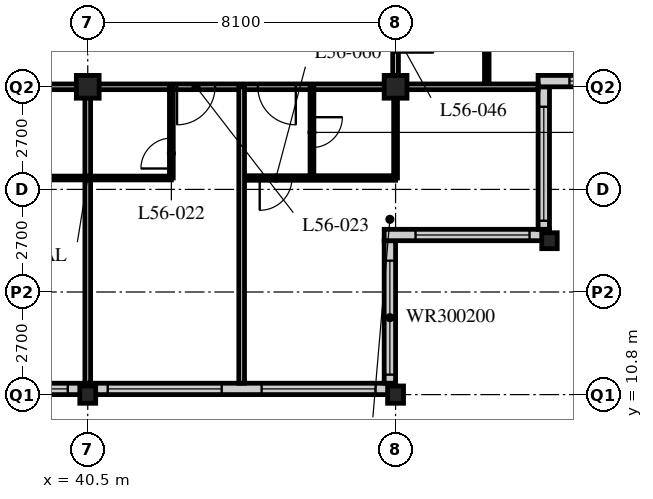
"""IFC4 building model, lengths in metres.
Left out: names, types, materials, properties, quantities, classifications, styles, units other than length and angle.
Written with IfcOpenShell. Run it as: python <this file> out.ifc"""

import sys

from ifc_helpers import new_model, si_unit, direction, frame, frame_2d, origin, origin_2d, place, context, subcontext, project, spatial, rectangle, hollow_rectangle, i_section, extrude, element, fill, save


model = new_model("IFC4")
c1 = context("Model", 3, precision=1e-05, world=origin(), true_north=direction((0.0, 1.0)))
c2 = subcontext(c1, "Body", "Model", "MODEL_VIEW")
j1 = project(units=[si_unit("LENGTHUNIT", "METRE"), si_unit("PLANEANGLEUNIT", "RADIAN")], contexts=[c1])
p1 = place(None, origin())
s1 = spatial("IfcSite", under=j1, at=p1, CompositionType="ELEMENT")
p2 = place(p1, origin())
s2 = spatial("IfcBuilding", under=s1, at=p2, CompositionType="ELEMENT")
p3 = place(p2, frame((0.0, 0.0, 217.2)))
s3 = spatial("IfcBuildingStorey", under=s2, at=p3, CompositionType="ELEMENT", Elevation=217.2)
p4 = place(p3, frame((40.5, 10.8, 0.0), z_axis=(0.0, 0.0, 1.0), x_axis=(1.0, 0.0, 0.0)))
e1 = element("IfcColumn", 1, at=p4, inside=s3, PredefinedType="COLUMN", context=c2, shape_type="SweptSolid", body=[
    extrude(i_section(OverallWidth=0.418, OverallDepth=0.456, WebThickness=0.042, FlangeThickness=0.067, FilletRadius=0.015, at=origin_2d()), origin(), (0.0, 0.0, 1.0), 3.6),
])
p5 = place(p3, frame((40.5, 18.9, 0.0), z_axis=(0.0, 0.0, 1.0), x_axis=(1.0, 0.0, 0.0)))
e2 = element("IfcColumn", 2, at=p5, inside=s3, PredefinedType="COLUMN", context=c2, shape_type="SweptSolid", body=[
    extrude(hollow_rectangle(XDim=0.6, YDim=0.6, WallThickness=0.05, at=origin_2d()), origin(), (0.0, 0.0, 1.0), 3.6),
])
p6 = place(p3, frame((48.6, 10.8, 0.0), z_axis=(0.0, 0.0, 1.0), x_axis=(1.0, 0.0, 0.0)))
e3 = element("IfcColumn", 3, at=p6, inside=s3, PredefinedType="COLUMN", context=c2, shape_type="SweptSolid", body=[
    extrude(i_section(OverallWidth=0.418, OverallDepth=0.456, WebThickness=0.042, FlangeThickness=0.067, FilletRadius=0.015, at=origin_2d()), origin(), (0.0, 0.0, 1.0), 3.6),
])
p7 = place(p3, frame((48.6, 18.9, 0.0), z_axis=(0.0, 0.0, 1.0), x_axis=(1.0, 0.0, 0.0)))
e4 = element("IfcColumn", 4, at=p7, inside=s3, PredefinedType="COLUMN", context=c2, shape_type="SweptSolid", body=[
    extrude(hollow_rectangle(XDim=0.6, YDim=0.6, WallThickness=0.05, at=origin_2d()), origin(), (0.0, 0.0, 1.0), 3.6),
])
p8 = place(p3, frame((52.65, 14.85, 0.0), z_axis=(0.0, 0.0, 1.0), x_axis=(1.0, 0.0, 0.0)))
e5 = element("IfcColumn", 5, at=p8, inside=s3, PredefinedType="COLUMN", context=c2, shape_type="SweptSolid", body=[
    extrude(i_section(OverallWidth=0.407, OverallDepth=0.419, WebThickness=0.031, FlangeThickness=0.049, FilletRadius=0.015, at=origin_2d()), origin(), (0.0, 0.0, 1.0), 3.6),
])
p9 = place(p3, frame((8.4, 10.95, 0.0), z_axis=(0.0, 0.0, 1.0), x_axis=(1.0, 0.0, 0.0)))
e6 = element("IfcWall", 6, at=p9, inside=s3, PredefinedType="SOLIDWALL", context=c2, shape_type="SweptSolid", body=[
    extrude(rectangle(XDim=40.2, YDim=0.3, at=frame_2d((20.1, 0.0))), origin(), (0.0, 0.0, 1.0), 3.39),
])
p10 = place(p9, frame((0.225, 0.0, 0.6)))
e7 = element("IfcOpeningElement", 7, at=p10, cuts=e6, PredefinedType="OPENING", context=c2, shape_type="SweptSolid", body=[
    extrude(rectangle(XDim=3.0, YDim=2.4, at=frame_2d((1.5, 1.2))), frame((0.0, 0.16, 0.0), z_axis=(0.0, -1.0, 0.0), x_axis=(1.0, 0.0, 0.0)), (0.0, 0.0, 1.0), 0.32),
])
p11 = place(p9, frame((4.275, 0.0, 0.6)))
e8 = element("IfcOpeningElement", 8, at=p11, cuts=e6, PredefinedType="OPENING", context=c2, shape_type="SweptSolid", body=[
    extrude(rectangle(XDim=3.0, YDim=2.4, at=frame_2d((1.5, 1.2))), frame((0.0, 0.16, 0.0), z_axis=(0.0, -1.0, 0.0), x_axis=(1.0, 0.0, 0.0)), (0.0, 0.0, 1.0), 0.32),
])
p12 = place(p9, frame((8.325, 0.0, 0.6)))
e9 = element("IfcOpeningElement", 9, at=p12, cuts=e6, PredefinedType="OPENING", context=c2, shape_type="SweptSolid", body=[
    extrude(rectangle(XDim=3.0, YDim=2.4, at=frame_2d((1.5, 1.2))), frame((0.0, 0.16, 0.0), z_axis=(0.0, -1.0, 0.0), x_axis=(1.0, 0.0, 0.0)), (0.0, 0.0, 1.0), 0.32),
])
p13 = place(p9, frame((12.375, 0.0, 0.6)))
e10 = element("IfcOpeningElement", 10, at=p13, cuts=e6, PredefinedType="OPENING", context=c2, shape_type="SweptSolid", body=[
    extrude(rectangle(XDim=3.0, YDim=2.4, at=frame_2d((1.5, 1.2))), frame((0.0, 0.16, 0.0), z_axis=(0.0, -1.0, 0.0), x_axis=(1.0, 0.0, 0.0)), (0.0, 0.0, 1.0), 0.32),
])
p14 = place(p9, frame((16.425, 0.0, 0.6)))
e11 = element("IfcOpeningElement", 11, at=p14, cuts=e6, PredefinedType="OPENING", context=c2, shape_type="SweptSolid", body=[
    extrude(rectangle(XDim=3.0, YDim=2.4, at=frame_2d((1.5, 1.2))), frame((0.0, 0.16, 0.0), z_axis=(0.0, -1.0, 0.0), x_axis=(1.0, 0.0, 0.0)), (0.0, 0.0, 1.0), 0.32),
])
p15 = place(p9, frame((20.475, 0.0, 0.6)))
e12 = element("IfcOpeningElement", 12, at=p15, cuts=e6, PredefinedType="OPENING", context=c2, shape_type="SweptSolid", body=[
    extrude(rectangle(XDim=3.0, YDim=2.4, at=frame_2d((1.5, 1.2))), frame((0.0, 0.16, 0.0), z_axis=(0.0, -1.0, 0.0), x_axis=(1.0, 0.0, 0.0)), (0.0, 0.0, 1.0), 0.32),
])
p16 = place(p9, frame((24.525, 0.0, 0.6)))
e13 = element("IfcOpeningElement", 13, at=p16, cuts=e6, PredefinedType="OPENING", context=c2, shape_type="SweptSolid", body=[
    extrude(rectangle(XDim=3.0, YDim=2.4, at=frame_2d((1.5, 1.2))), frame((0.0, 0.16, 0.0), z_axis=(0.0, -1.0, 0.0), x_axis=(1.0, 0.0, 0.0)), (0.0, 0.0, 1.0), 0.32),
])
p17 = place(p9, frame((28.575, 0.0, 0.6)))
e14 = element("IfcOpeningElement", 14, at=p17, cuts=e6, PredefinedType="OPENING", context=c2, shape_type="SweptSolid", body=[
    extrude(rectangle(XDim=3.0, YDim=2.4, at=frame_2d((1.5, 1.2))), frame((0.0, 0.16, 0.0), z_axis=(0.0, -1.0, 0.0), x_axis=(1.0, 0.0, 0.0)), (0.0, 0.0, 1.0), 0.32),
])
p18 = place(p9, frame((32.625, 0.0, 0.6)))
e15 = element("IfcOpeningElement", 15, at=p18, cuts=e6, PredefinedType="OPENING", context=c2, shape_type="SweptSolid", body=[
    extrude(rectangle(XDim=3.0, YDim=2.4, at=frame_2d((1.5, 1.2))), frame((0.0, 0.16, 0.0), z_axis=(0.0, -1.0, 0.0), x_axis=(1.0, 0.0, 0.0)), (0.0, 0.0, 1.0), 0.32),
])
p19 = place(p9, frame((36.675, 0.0, 0.6)))
e16 = element("IfcOpeningElement", 16, at=p19, cuts=e6, PredefinedType="OPENING", context=c2, shape_type="SweptSolid", body=[
    extrude(rectangle(XDim=3.0, YDim=2.4, at=frame_2d((1.5, 1.2))), frame((0.0, 0.16, 0.0), z_axis=(0.0, -1.0, 0.0), x_axis=(1.0, 0.0, 0.0)), (0.0, 0.0, 1.0), 0.32),
])
p20 = place(p3, frame((48.45, 11.1, 0.0), z_axis=(0.0, 0.0, 1.0), x_axis=(0.0, 1.0, 0.0)))
e17 = element("IfcWall", 17, at=p20, inside=s3, PredefinedType="SOLIDWALL", context=c2, shape_type="SweptSolid", body=[
    extrude(rectangle(XDim=3.75, YDim=0.3, at=frame_2d((1.875, 0.0))), origin(), (0.0, 0.0, 1.0), 3.39),
])
p21 = place(p20, frame((0.225, 0.0, 0.6)))
e18 = element("IfcOpeningElement", 18, at=p21, cuts=e17, PredefinedType="OPENING", context=c2, shape_type="SweptSolid", body=[
    extrude(rectangle(XDim=3.0, YDim=2.0, at=frame_2d((1.5, 1.0))), frame((0.0, 0.16, 0.0), z_axis=(0.0, -1.0, 0.0), x_axis=(1.0, 0.0, 0.0)), (0.0, 0.0, 1.0), 0.32),
])
p22 = place(p3, frame((48.3, 15.0, 0.0), z_axis=(0.0, 0.0, 1.0), x_axis=(1.0, 0.0, 0.0)))
e19 = element("IfcWall", 19, at=p22, inside=s3, PredefinedType="SOLIDWALL", context=c2, shape_type="SweptSolid", body=[
    extrude(rectangle(XDim=4.35, YDim=0.3, at=frame_2d((2.175, 0.0))), origin(), (0.0, 0.0, 1.0), 3.39),
])
p23 = place(p22, frame((0.825, 0.0, 0.6)))
e20 = element("IfcOpeningElement", 20, at=p23, cuts=e19, PredefinedType="OPENING", context=c2, shape_type="SweptSolid", body=[
    extrude(rectangle(XDim=3.0, YDim=2.0, at=frame_2d((1.5, 1.0))), frame((0.0, 0.16, 0.0), z_axis=(0.0, -1.0, 0.0), x_axis=(1.0, 0.0, 0.0)), (0.0, 0.0, 1.0), 0.32),
])
p24 = place(p3, frame((52.5, 15.15, 0.0), z_axis=(0.0, 0.0, 1.0), x_axis=(0.0, 1.0, 0.0)))
e21 = element("IfcWall", 21, at=p24, inside=s3, PredefinedType="SOLIDWALL", context=c2, shape_type="SweptSolid", body=[
    extrude(rectangle(XDim=3.75, YDim=0.3, at=frame_2d((1.875, 0.0))), origin(), (0.0, 0.0, 1.0), 3.39),
])
p25 = place(p24, frame((0.225, 0.0, 0.6)))
e22 = element("IfcOpeningElement", 22, at=p25, cuts=e21, PredefinedType="OPENING", context=c2, shape_type="SweptSolid", body=[
    extrude(rectangle(XDim=3.0, YDim=2.0, at=frame_2d((1.5, 1.0))), frame((0.0, 0.16, 0.0), z_axis=(0.0, -1.0, 0.0), x_axis=(1.0, 0.0, 0.0)), (0.0, 0.0, 1.0), 0.32),
])
p26 = place(p3, frame((52.35, 19.05, 0.0), z_axis=(0.0, 0.0, 1.0), x_axis=(1.0, 0.0, 0.0)))
e23 = element("IfcWall", 23, at=p26, inside=s3, PredefinedType="SOLIDWALL", context=c2, shape_type="SweptSolid", body=[
    extrude(rectangle(XDim=4.35, YDim=0.3, at=frame_2d((2.175, 0.0))), origin(), (0.0, 0.0, 1.0), 3.39),
])
p27 = place(p26, frame((0.825, 0.0, 0.6)))
e24 = element("IfcOpeningElement", 24, at=p27, cuts=e23, PredefinedType="OPENING", context=c2, shape_type="SweptSolid", body=[
    extrude(rectangle(XDim=3.0, YDim=2.0, at=frame_2d((1.5, 1.0))), frame((0.0, 0.16, 0.0), z_axis=(0.0, -1.0, 0.0), x_axis=(1.0, 0.0, 0.0)), (0.0, 0.0, 1.0), 0.32),
])
p28 = place(p3, frame((12.15, 18.9, 0.0), z_axis=(0.0, 0.0, 1.0), x_axis=(1.0, 0.0, 0.0)))
e25 = element("IfcWall", 25, at=p28, inside=s3, PredefinedType="PARTITIONING", context=c2, shape_type="SweptSolid", body=[
    extrude(rectangle(XDim=36.45, YDim=0.15, at=frame_2d((18.225, 0.0))), origin(), (0.0, 0.0, 1.0), 2.778),
])
p29 = place(p28, frame((4.95, 0.0, 0.0)))
e26 = element("IfcOpeningElement", 26, at=p29, cuts=e25, PredefinedType="OPENING", context=c2, shape_type="SweptSolid", body=[
    extrude(rectangle(XDim=1.0, YDim=2.1, at=frame_2d((0.5, 1.05))), frame((0.0, 0.085, 0.0), z_axis=(0.0, -1.0, 0.0), x_axis=(1.0, 0.0, 0.0)), (0.0, 0.0, 1.0), 0.17),
])
p30 = place(p28, frame((22.6, 0.0, 0.0)))
e27 = element("IfcOpeningElement", 27, at=p30, cuts=e25, PredefinedType="OPENING", context=c2, shape_type="SweptSolid", body=[
    extrude(rectangle(XDim=1.0, YDim=2.1, at=frame_2d((0.5, 1.05))), frame((0.0, 0.085, 0.0), z_axis=(0.0, -1.0, 0.0), x_axis=(1.0, 0.0, 0.0)), (0.0, 0.0, 1.0), 0.17),
])
p31 = place(p28, frame((25.0, 0.0, 0.0)))
e28 = element("IfcOpeningElement", 28, at=p31, cuts=e25, PredefinedType="OPENING", context=c2, shape_type="SweptSolid", body=[
    extrude(rectangle(XDim=1.0, YDim=2.1, at=frame_2d((0.5, 1.05))), frame((0.0, 0.085, 0.0), z_axis=(0.0, -1.0, 0.0), x_axis=(1.0, 0.0, 0.0)), (0.0, 0.0, 1.0), 0.17),
])
p32 = place(p28, frame((30.7, 0.0, 0.0)))
e29 = element("IfcOpeningElement", 29, at=p32, cuts=e25, PredefinedType="OPENING", context=c2, shape_type="SweptSolid", body=[
    extrude(rectangle(XDim=1.0, YDim=2.1, at=frame_2d((0.5, 1.05))), frame((0.0, 0.085, 0.0), z_axis=(0.0, -1.0, 0.0), x_axis=(1.0, 0.0, 0.0)), (0.0, 0.0, 1.0), 0.17),
])
p33 = place(p28, frame((1.525, 0.0, 0.0)))
e30 = element("IfcOpeningElement", 30, at=p33, cuts=e25, PredefinedType="OPENING", context=c2, shape_type="SweptSolid", body=[
    extrude(rectangle(XDim=1.0, YDim=2.1, at=frame_2d((0.5, 1.05))), frame((0.0, 0.085, 0.0), z_axis=(0.0, -1.0, 0.0), x_axis=(1.0, 0.0, 0.0)), (0.0, 0.0, 1.0), 0.17),
])
p34 = place(p28, frame((32.825, 0.0, 0.0)))
e31 = element("IfcOpeningElement", 31, at=p34, cuts=e25, PredefinedType="OPENING", context=c2, shape_type="SweptSolid", body=[
    extrude(rectangle(XDim=1.0, YDim=2.1, at=frame_2d((0.5, 1.05))), frame((0.0, 0.085, 0.0), z_axis=(0.0, -1.0, 0.0), x_axis=(1.0, 0.0, 0.0)), (0.0, 0.0, 1.0), 0.17),
])
p35 = place(p3, frame((48.6, 18.9, 0.0), z_axis=(0.0, 0.0, 1.0), x_axis=(0.0, 1.0, 0.0)))
e32 = element("IfcWall", 32, at=p35, inside=s3, PredefinedType="PARTITIONING", context=c2, shape_type="SweptSolid", body=[
    extrude(rectangle(XDim=24.3, YDim=0.15, at=frame_2d((12.15, 0.0))), origin(), (0.0, 0.0, 1.0), 2.778),
])
p36 = place(p35, frame((0.9, 0.0, 0.0)))
e33 = element("IfcOpeningElement", 33, at=p36, cuts=e32, PredefinedType="OPENING", context=c2, shape_type="SweptSolid", body=[
    extrude(rectangle(XDim=1.0, YDim=2.1, at=frame_2d((0.5, 1.05))), frame((0.0, 0.085, 0.0), z_axis=(0.0, -1.0, 0.0), x_axis=(1.0, 0.0, 0.0)), (0.0, 0.0, 1.0), 0.17),
])
p37 = place(p35, frame((20.95, 0.0, 0.0)))
e34 = element("IfcOpeningElement", 34, at=p37, cuts=e32, PredefinedType="OPENING", context=c2, shape_type="SweptSolid", body=[
    extrude(rectangle(XDim=1.0, YDim=2.1, at=frame_2d((0.5, 1.05))), frame((0.0, 0.085, 0.0), z_axis=(0.0, -1.0, 0.0), x_axis=(1.0, 0.0, 0.0)), (0.0, 0.0, 1.0), 0.17),
])
p38 = place(p3, frame((38.3, 16.5, 0.0), z_axis=(0.0, 0.0, 1.0), x_axis=(1.0, 0.0, 0.0)))
e35 = element("IfcWall", 35, at=p38, inside=s3, PredefinedType="PARTITIONING", context=c2, shape_type="SweptSolid", body=[
    extrude(rectangle(XDim=4.4, YDim=0.1, at=frame_2d((2.2, 0.0))), origin(), (0.0, 0.0, 1.0), 3.39),
])
p39 = place(p3, frame((40.5, 18.9, 0.0), z_axis=(0.0, 0.0, 1.0), x_axis=(0.0, -1.0, 0.0)))
e36 = element("IfcWall", 36, at=p39, inside=s3, PredefinedType="PARTITIONING", context=c2, shape_type="SweptSolid", body=[
    extrude(rectangle(XDim=7.8, YDim=0.15, at=frame_2d((3.9, 0.0))), origin(), (0.0, 0.0, 1.0), 2.778),
])
p40 = place(p3, frame((42.7, 18.9, 0.0), z_axis=(0.0, 0.0, 1.0), x_axis=(0.0, -1.0, 0.0)))
e37 = element("IfcWall", 37, at=p40, inside=s3, PredefinedType="PARTITIONING", context=c2, shape_type="SweptSolid", body=[
    extrude(rectangle(XDim=2.4, YDim=0.1, at=frame_2d((1.2, 0.0))), origin(), (0.0, 0.0, 1.0), 3.39),
])
p41 = place(p40, frame((1.35, 0.0, 0.0)))
e38 = element("IfcOpeningElement", 38, at=p41, cuts=e37, PredefinedType="OPENING", context=c2, shape_type="SweptSolid", body=[
    extrude(rectangle(XDim=0.8, YDim=2.1, at=frame_2d((0.4, 1.05))), frame((0.0, 0.06, 0.0), z_axis=(0.0, -1.0, 0.0), x_axis=(1.0, 0.0, 0.0)), (0.0, 0.0, 1.0), 0.12),
])
p42 = place(p3, frame((51.0, 18.9, 0.0), z_axis=(0.0, 0.0, 1.0), x_axis=(0.0, 1.0, 0.0)))
e39 = element("IfcWall", 39, at=p42, inside=s3, PredefinedType="PARTITIONING", context=c2, shape_type="SweptSolid", body=[
    extrude(rectangle(XDim=20.25, YDim=0.12, at=frame_2d((10.125, 0.0))), origin(), (0.0, 0.0, 1.0), 3.39),
])
p43 = place(p42, frame((0.975, 0.0, 0.0)))
e40 = element("IfcOpeningElement", 40, at=p43, cuts=e39, PredefinedType="OPENING", context=c2, shape_type="SweptSolid", body=[
    extrude(rectangle(XDim=0.85, YDim=2.1, at=frame_2d((0.425, 1.05))), frame((0.0, 0.07, 0.0), z_axis=(0.0, -1.0, 0.0), x_axis=(1.0, 0.0, 0.0)), (0.0, 0.0, 1.0), 0.14),
])
p44 = place(p42, frame((8.425, 0.0, 0.0)))
e41 = element("IfcOpeningElement", 41, at=p44, cuts=e39, PredefinedType="OPENING", context=c2, shape_type="SweptSolid", body=[
    extrude(rectangle(XDim=0.85, YDim=2.1, at=frame_2d((0.425, 1.05))), frame((0.0, 0.07, 0.0), z_axis=(0.0, -1.0, 0.0), x_axis=(1.0, 0.0, 0.0)), (0.0, 0.0, 1.0), 0.14),
])
p45 = place(p42, frame((12.475, 0.0, 0.0)))
e42 = element("IfcOpeningElement", 42, at=p45, cuts=e39, PredefinedType="OPENING", context=c2, shape_type="SweptSolid", body=[
    extrude(rectangle(XDim=0.85, YDim=2.1, at=frame_2d((0.425, 1.05))), frame((0.0, 0.07, 0.0), z_axis=(0.0, -1.0, 0.0), x_axis=(1.0, 0.0, 0.0)), (0.0, 0.0, 1.0), 0.14),
])
p46 = place(p42, frame((16.525, 0.0, 0.0)))
e43 = element("IfcOpeningElement", 43, at=p46, cuts=e39, PredefinedType="OPENING", context=c2, shape_type="SweptSolid", body=[
    extrude(rectangle(XDim=0.85, YDim=2.1, at=frame_2d((0.425, 1.05))), frame((0.0, 0.07, 0.0), z_axis=(0.0, -1.0, 0.0), x_axis=(1.0, 0.0, 0.0)), (0.0, 0.0, 1.0), 0.14),
])
p47 = place(p3, frame((44.55, 16.5, 0.0), z_axis=(0.0, 0.0, 1.0), x_axis=(1.0, 0.0, 0.0)))
e44 = element("IfcWall", 44, at=p47, inside=s3, PredefinedType="PARTITIONING", context=c2, shape_type="SweptSolid", body=[
    extrude(rectangle(XDim=4.05, YDim=0.12, at=frame_2d((2.025, 0.0))), origin(), (0.0, 0.0, 1.0), 3.39),
])
p48 = place(p47, frame((0.475, 0.0, 0.0)))
e45 = element("IfcOpeningElement", 45, at=p48, cuts=e44, PredefinedType="OPENING", context=c2, shape_type="SweptSolid", body=[
    extrude(rectangle(XDim=0.85, YDim=2.1, at=frame_2d((0.425, 1.05))), frame((0.0, 0.07, 0.0), z_axis=(0.0, -1.0, 0.0), x_axis=(1.0, 0.0, 0.0)), (0.0, 0.0, 1.0), 0.14),
])
p49 = place(p3, frame((46.4, 18.9, 0.0), z_axis=(0.0, 0.0, 1.0), x_axis=(0.0, -1.0, 0.0)))
e46 = element("IfcWall", 46, at=p49, inside=s3, PredefinedType="PARTITIONING", context=c2, shape_type="SweptSolid", body=[
    extrude(rectangle(XDim=2.4, YDim=0.1, at=frame_2d((1.2, 0.0))), origin(), (0.0, 0.0, 1.0), 3.39),
])
p50 = place(p49, frame((0.8, 0.0, 0.0)))
e47 = element("IfcOpeningElement", 47, at=p50, cuts=e46, PredefinedType="OPENING", context=c2, shape_type="SweptSolid", body=[
    extrude(rectangle(XDim=0.8, YDim=2.1, at=frame_2d((0.4, 1.05))), frame((0.0, 0.06, 0.0), z_axis=(0.0, -1.0, 0.0), x_axis=(1.0, 0.0, 0.0)), (0.0, 0.0, 1.0), 0.12),
])
p51 = place(p3, frame((48.6, 18.9, 0.0), z_axis=(0.0, 0.0, 1.0), x_axis=(0.0, -1.0, 0.0)))
e48 = element("IfcWall", 48, at=p51, inside=s3, PredefinedType="PARTITIONING", context=c2, shape_type="SweptSolid", body=[
    extrude(rectangle(XDim=2.4, YDim=0.1, at=frame_2d((1.2, 0.0))), origin(), (0.0, 0.0, 1.0), 2.778),
])
p52 = place(p3, frame((48.6, 18.9, 0.0), z_axis=(0.0, 0.0, 1.0), x_axis=(1.0, 0.0, 0.0)))
e49 = element("IfcWall", 49, at=p52, inside=s3, PredefinedType="PARTITIONING", context=c2, shape_type="SweptSolid", body=[
    extrude(rectangle(XDim=3.75, YDim=0.15, at=frame_2d((1.875, 0.0))), origin(), (0.0, 0.0, 1.0), 2.778),
])
p53 = place(p3, frame((44.55, 18.9, 0.0), z_axis=(0.0, 0.0, 1.0), x_axis=(0.0, -1.0, 0.0)))
e50 = element("IfcWall", 50, at=p53, inside=s3, PredefinedType="PARTITIONING", context=c2, shape_type="SweptSolid", body=[
    extrude(rectangle(XDim=7.8, YDim=0.15, at=frame_2d((3.9, 0.0))), origin(), (0.0, 0.0, 1.0), 3.39),
])
p54 = place(p17, origin())
e51 = element("IfcWindow", 51, at=p54, inside=s3, PartitioningType="SINGLE_PANEL", PredefinedType="WINDOW", context=c2, shape_type="SweptSolid", body=[
    extrude(rectangle(XDim=3.0, YDim=2.4, at=frame_2d((1.5, 1.2))), frame((0.0, 0.03, 0.0), z_axis=(0.0, -1.0, 0.0), x_axis=(1.0, 0.0, 0.0)), (0.0, 0.0, 1.0), 0.06),
])
fill(e14, e51)
p55 = place(p18, origin())
e52 = element("IfcWindow", 52, at=p55, inside=s3, PartitioningType="SINGLE_PANEL", PredefinedType="WINDOW", context=c2, shape_type="SweptSolid", body=[
    extrude(rectangle(XDim=3.0, YDim=2.4, at=frame_2d((1.5, 1.2))), frame((0.0, 0.03, 0.0), z_axis=(0.0, -1.0, 0.0), x_axis=(1.0, 0.0, 0.0)), (0.0, 0.0, 1.0), 0.06),
])
fill(e15, e52)
p56 = place(p19, origin())
e53 = element("IfcWindow", 53, at=p56, inside=s3, PartitioningType="SINGLE_PANEL", PredefinedType="WINDOW", context=c2, shape_type="SweptSolid", body=[
    extrude(rectangle(XDim=3.0, YDim=2.4, at=frame_2d((1.5, 1.2))), frame((0.0, 0.03, 0.0), z_axis=(0.0, -1.0, 0.0), x_axis=(1.0, 0.0, 0.0)), (0.0, 0.0, 1.0), 0.06),
])
fill(e16, e53)
p57 = place(p21, origin())
e54 = element("IfcWindow", 54, at=p57, inside=s3, PartitioningType="SINGLE_PANEL", PredefinedType="WINDOW", context=c2, shape_type="SweptSolid", body=[
    extrude(rectangle(XDim=3.0, YDim=2.0, at=frame_2d((1.5, 1.0))), frame((0.0, 0.03, 0.0), z_axis=(0.0, -1.0, 0.0), x_axis=(1.0, 0.0, 0.0)), (0.0, 0.0, 1.0), 0.06),
])
fill(e18, e54)
p58 = place(p23, origin())
e55 = element("IfcWindow", 55, at=p58, inside=s3, PartitioningType="SINGLE_PANEL", PredefinedType="WINDOW", context=c2, shape_type="SweptSolid", body=[
    extrude(rectangle(XDim=3.0, YDim=2.0, at=frame_2d((1.5, 1.0))), frame((0.0, 0.03, 0.0), z_axis=(0.0, -1.0, 0.0), x_axis=(1.0, 0.0, 0.0)), (0.0, 0.0, 1.0), 0.06),
])
fill(e20, e55)
p59 = place(p25, origin())
e56 = element("IfcWindow", 56, at=p59, inside=s3, PartitioningType="SINGLE_PANEL", PredefinedType="WINDOW", context=c2, shape_type="SweptSolid", body=[
    extrude(rectangle(XDim=3.0, YDim=2.0, at=frame_2d((1.5, 1.0))), frame((0.0, 0.03, 0.0), z_axis=(0.0, -1.0, 0.0), x_axis=(1.0, 0.0, 0.0)), (0.0, 0.0, 1.0), 0.06),
])
fill(e22, e56)
p60 = place(p27, origin())
e57 = element("IfcWindow", 57, at=p60, inside=s3, PartitioningType="SINGLE_PANEL", PredefinedType="WINDOW", context=c2, shape_type="SweptSolid", body=[
    extrude(rectangle(XDim=3.0, YDim=2.0, at=frame_2d((1.5, 1.0))), frame((0.0, 0.03, 0.0), z_axis=(0.0, -1.0, 0.0), x_axis=(1.0, 0.0, 0.0)), (0.0, 0.0, 1.0), 0.06),
])
fill(e24, e57)
p61 = place(p41, origin())
e58 = element("IfcDoor", 58, at=p61, inside=s3, OperationType="SINGLE_SWING_LEFT", PredefinedType="DOOR", context=c2, shape_type="SweptSolid", body=[
    extrude(rectangle(XDim=0.8, YDim=2.1, at=frame_2d((0.4, 1.05))), frame((0.0, 0.025, 0.0), z_axis=(0.0, -1.0, 0.0), x_axis=(1.0, 0.0, 0.0)), (0.0, 0.0, 1.0), 0.05),
])
fill(e38, e58)
p62 = place(p32, origin())
e59 = element("IfcDoor", 59, at=p62, inside=s3, OperationType="SINGLE_SWING_RIGHT", PredefinedType="DOOR", context=c2, shape_type="SweptSolid", body=[
    extrude(rectangle(XDim=1.0, YDim=2.1, at=frame_2d((0.5, 1.05))), frame((0.0, 0.025, 0.0), z_axis=(0.0, -1.0, 0.0), x_axis=(1.0, 0.0, 0.0)), (0.0, 0.0, 1.0), 0.05),
])
fill(e29, e59)
p63 = place(p36, origin())
e60 = element("IfcDoor", 60, at=p63, inside=s3, OperationType="SINGLE_SWING_RIGHT", PredefinedType="DOOR", context=c2, shape_type="SweptSolid", body=[
    extrude(rectangle(XDim=1.0, YDim=2.1, at=frame_2d((0.5, 1.05))), frame((0.0, 0.025, 0.0), z_axis=(0.0, -1.0, 0.0), x_axis=(1.0, 0.0, 0.0)), (0.0, 0.0, 1.0), 0.05),
])
fill(e33, e60)
p64 = place(p50, origin())
e61 = element("IfcDoor", 61, at=p64, inside=s3, OperationType="SINGLE_SWING_LEFT", PredefinedType="DOOR", context=c2, shape_type="SweptSolid", body=[
    extrude(rectangle(XDim=0.8, YDim=2.1, at=frame_2d((0.4, 1.05))), frame((0.0, 0.025, 0.0), z_axis=(0.0, -1.0, 0.0), x_axis=(1.0, 0.0, 0.0)), (0.0, 0.0, 1.0), 0.05),
])
fill(e47, e61)
p65 = place(p34, origin())
e62 = element("IfcDoor", 62, at=p65, inside=s3, OperationType="SINGLE_SWING_LEFT", PredefinedType="DOOR", context=c2, shape_type="SweptSolid", body=[
    extrude(rectangle(XDim=1.0, YDim=2.1, at=frame_2d((0.5, 1.05))), frame((0.0, 0.025, 0.0), z_axis=(0.0, -1.0, 0.0), x_axis=(1.0, 0.0, 0.0)), (0.0, 0.0, 1.0), 0.05),
])
fill(e31, e62)
p66 = place(p48, origin())
e63 = element("IfcDoor", 63, at=p66, inside=s3, OperationType="SINGLE_SWING_RIGHT", PredefinedType="DOOR", context=c2, shape_type="SweptSolid", body=[
    extrude(rectangle(XDim=0.85, YDim=2.1, at=frame_2d((0.425, 1.05))), frame((0.0, 0.025, 0.0), z_axis=(0.0, -1.0, 0.0), x_axis=(1.0, 0.0, 0.0)), (0.0, 0.0, 1.0), 0.05),
])
fill(e45, e63)
save(model, sys.argv[1])
